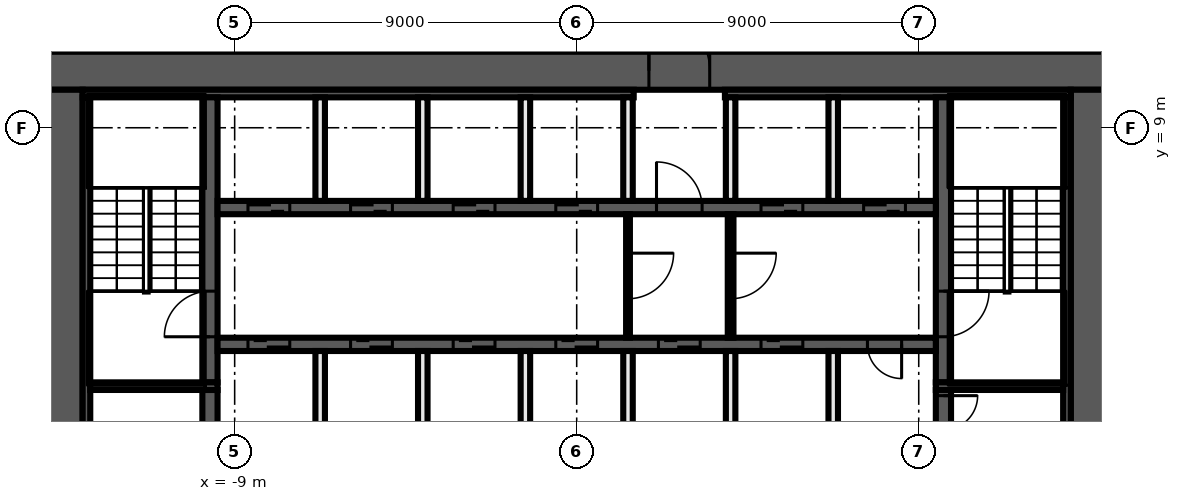
"""IFC4 building model, lengths in metres.
Left out: names, types, materials, properties, quantities, classifications, styles, units other than length and angle.
Written with IfcOpenShell. Run it as: python <this file> out.ifc"""

import sys

from ifc_helpers import new_model, si_unit, direction, frame, frame_2d, origin, place, context, subcontext, project, spatial, rectangle, extrude, element, fill, save


model = new_model("IFC4")
c1 = context("Model", 3, precision=1e-05, world=origin(), true_north=direction((0.0, 1.0)))
c2 = subcontext(c1, "Body", "Model", "MODEL_VIEW")
j1 = project(units=[si_unit("LENGTHUNIT", "METRE"), si_unit("PLANEANGLEUNIT", "RADIAN")], contexts=[c1])
p1 = place(None, origin())
s1 = spatial("IfcSite", under=j1, at=p1, CompositionType="ELEMENT")
p2 = place(p1, origin())
s2 = spatial("IfcBuilding", under=s1, at=p2, CompositionType="ELEMENT")
p3 = place(p2, frame((0.0, 0.0, 139.6)))
s3 = spatial("IfcBuildingStorey", under=s2, at=p3, CompositionType="ELEMENT", Elevation=139.6)
p4 = place(p3, frame((-14.0, 10.5, 0.0), z_axis=(0.0, 0.0, 1.0), x_axis=(1.0, 0.0, 0.0)))
e1 = element("IfcWall", 1, at=p4, inside=s3, PredefinedType="SHEAR", context=c2, shape_type="SweptSolid", body=[
    extrude(rectangle(XDim=28.0, YDim=1.0, at=frame_2d((14.0, 0.0))), origin(), (0.0, 0.0, 1.0), 5.4),
])
p5 = place(p4, frame((15.9, 0.0, 0.0)))
e2 = element("IfcOpeningElement", 2, at=p5, cuts=e1, PredefinedType="OPENING", context=c2, shape_type="SweptSolid", body=[
    extrude(rectangle(XDim=1.6, YDim=2.1, at=frame_2d((0.8, 1.05))), frame((0.0, 0.51, 0.0), z_axis=(0.0, -1.0, 0.0), x_axis=(1.0, 0.0, 0.0)), (0.0, 0.0, 1.0), 1.02),
])
for number, where, z_axis, x_axis in (
    (3, (13.5, 10.0, 0.0), (0.0, 0.0, 1.0), (0.0, -1.0, 0.0)),
    (4, (-13.5, -10.0, 0.0), (0.0, 0.0, 1.0), (0.0, 1.0, 0.0)),
):
    element("IfcWall", number, at=place(p3, frame(where, z_axis=z_axis, x_axis=x_axis)), inside=s3, PredefinedType="SHEAR", context=c2, shape_type="SweptSolid", body=[
        extrude(rectangle(XDim=20.0, YDim=1.0, at=frame_2d((10.0, 0.0))), origin(), (0.0, 0.0, 1.0), 5.4),
    ])
p6 = place(p3, frame((-13.0, 9.9, 0.0), z_axis=(0.0, 0.0, 1.0), x_axis=(1.0, 0.0, 0.0)))
e5 = element("IfcWall", 5, at=p6, inside=s3, PredefinedType="SHEAR", context=c2, shape_type="SweptSolid", body=[
    extrude(rectangle(XDim=14.5, YDim=0.2, at=frame_2d((7.25, 0.0))), origin(), (0.0, 0.0, 1.0), 5.4),
])
p7 = place(p3, frame((3.9, 9.9, 0.0), z_axis=(0.0, 0.0, 1.0), x_axis=(1.0, 0.0, 0.0)))
e6 = element("IfcWall", 6, at=p7, inside=s3, PredefinedType="SHEAR", context=c2, shape_type="SweptSolid", body=[
    extrude(rectangle(XDim=9.1, YDim=0.2, at=frame_2d((4.55, 0.0))), origin(), (0.0, 0.0, 1.0), 5.4),
])
for number, where, z_axis, x_axis in (
    (7, (12.9, 9.8, 0.0), (0.0, 0.0, 1.0), (0.0, -1.0, 0.0)),
    (8, (-12.9, -9.8, 0.0), (0.0, 0.0, 1.0), (0.0, 1.0, 0.0)),
):
    element("IfcWall", number, at=place(p3, frame(where, z_axis=z_axis, x_axis=x_axis)), inside=s3, PredefinedType="SHEAR", context=c2, shape_type="SweptSolid", body=[
        extrude(rectangle(XDim=19.6, YDim=0.2, at=frame_2d((9.8, 0.0))), origin(), (0.0, 0.0, 1.0), 5.4),
    ])
p8 = place(p3, frame((9.65, 2.1, 0.0), z_axis=(0.0, 0.0, 1.0), x_axis=(0.0, -1.0, 0.0)))
e9 = element("IfcWall", 9, at=p8, inside=s3, PredefinedType="SHEAR", context=c2, shape_type="SweptSolid", body=[
    extrude(rectangle(XDim=4.2, YDim=0.4, at=frame_2d((2.1, 0.0))), origin(), (0.0, 0.0, 1.0), 5.4),
])
p9 = place(p8, frame((0.15, 0.0, 0.0)))
e10 = element("IfcOpeningElement", 10, at=p9, cuts=e9, PredefinedType="OPENING", context=c2, shape_type="SweptSolid", body=[
    extrude(rectangle(XDim=0.9, YDim=2.1, at=frame_2d((0.45, 1.05))), frame((0.0, 0.21, 0.0), z_axis=(0.0, -1.0, 0.0), x_axis=(1.0, 0.0, 0.0)), (0.0, 0.0, 1.0), 0.42),
])
p10 = place(p3, frame((9.65, 9.8, 0.0), z_axis=(0.0, 0.0, 1.0), x_axis=(0.0, -1.0, 0.0)))
e11 = element("IfcWall", 11, at=p10, inside=s3, PredefinedType="SHEAR", context=c2, shape_type="SweptSolid", body=[
    extrude(rectangle(XDim=7.5, YDim=0.4, at=frame_2d((3.75, 0.0))), origin(), (0.0, 0.0, 1.0), 5.4),
])
p11 = place(p10, frame((5.1, 0.0, 0.0)))
e12 = element("IfcOpeningElement", 12, at=p11, cuts=e11, PredefinedType="OPENING", context=c2, shape_type="SweptSolid", body=[
    extrude(rectangle(XDim=1.2, YDim=2.1, at=frame_2d((0.6, 1.05))), frame((0.0, 0.21, 0.0), z_axis=(0.0, -1.0, 0.0), x_axis=(1.0, 0.0, 0.0)), (0.0, 0.0, 1.0), 0.42),
])
p12 = place(p3, frame((-9.65, -2.1, 0.0), z_axis=(0.0, 0.0, 1.0), x_axis=(0.0, 1.0, 0.0)))
e13 = element("IfcWall", 13, at=p12, inside=s3, PredefinedType="SHEAR", context=c2, shape_type="SweptSolid", body=[
    extrude(rectangle(XDim=4.2, YDim=0.4, at=frame_2d((2.1, 0.0))), origin(), (0.0, 0.0, 1.0), 5.4),
])
p13 = place(p3, frame((-9.65, 2.3, 0.0), z_axis=(0.0, 0.0, 1.0), x_axis=(0.0, 1.0, 0.0)))
e14 = element("IfcWall", 14, at=p13, inside=s3, PredefinedType="SHEAR", context=c2, shape_type="SweptSolid", body=[
    extrude(rectangle(XDim=7.5, YDim=0.4, at=frame_2d((3.75, 0.0))), origin(), (0.0, 0.0, 1.0), 5.4),
])
p14 = place(p13, frame((1.2, 0.0, 0.0)))
e15 = element("IfcOpeningElement", 15, at=p14, cuts=e14, PredefinedType="OPENING", context=c2, shape_type="SweptSolid", body=[
    extrude(rectangle(XDim=1.2, YDim=2.1, at=frame_2d((0.6, 1.05))), frame((0.0, 0.21, 0.0), z_axis=(0.0, -1.0, 0.0), x_axis=(1.0, 0.0, 0.0)), (0.0, 0.0, 1.0), 0.42),
])
for number, where, z_axis, x_axis in (
    (16, (9.45, 2.2, 0.0), (0.0, 0.0, 1.0), (1.0, 0.0, 0.0)),
    (17, (-9.45, 2.2, 0.0), (0.0, 0.0, 1.0), (-1.0, 0.0, 0.0)),
):
    element("IfcWall", number, at=place(p3, frame(where, z_axis=z_axis, x_axis=x_axis)), inside=s3, PredefinedType="SHEAR", context=c2, shape_type="SweptSolid", body=[
        extrude(rectangle(XDim=3.35, YDim=0.2, at=frame_2d((1.675, 0.0))), origin(), (0.0, 0.0, 1.0), 5.4),
    ])
p15 = place(p3, frame((-9.45, 6.9, 0.0), z_axis=(0.0, 0.0, 1.0), x_axis=(1.0, 0.0, 0.0)))
e18 = element("IfcWall", 18, at=p15, inside=s3, PredefinedType="SHEAR", context=c2, shape_type="SweptSolid", body=[
    extrude(rectangle(XDim=18.9, YDim=0.35, at=frame_2d((9.45, 0.0))), origin(), (0.0, 0.0, 1.0), 5.4),
])
p16 = place(p15, frame((0.8, 0.0, 0.0)))
e19 = element("IfcOpeningElement", 19, at=p16, cuts=e18, PredefinedType="OPENING", context=c2, shape_type="SweptSolid", body=[
    extrude(rectangle(XDim=1.1, YDim=2.1, at=frame_2d((0.55, 1.05))), frame((0.0, 0.185, 0.0), z_axis=(0.0, -1.0, 0.0), x_axis=(1.0, 0.0, 0.0)), (0.0, 0.0, 1.0), 0.37),
])
p17 = place(p15, frame((3.5, 0.0, 0.0)))
e20 = element("IfcOpeningElement", 20, at=p17, cuts=e18, PredefinedType="OPENING", context=c2, shape_type="SweptSolid", body=[
    extrude(rectangle(XDim=1.1, YDim=2.1, at=frame_2d((0.55, 1.05))), frame((0.0, 0.185, 0.0), z_axis=(0.0, -1.0, 0.0), x_axis=(1.0, 0.0, 0.0)), (0.0, 0.0, 1.0), 0.37),
])
p18 = place(p15, frame((6.2, 0.0, 0.0)))
e21 = element("IfcOpeningElement", 21, at=p18, cuts=e18, PredefinedType="OPENING", context=c2, shape_type="SweptSolid", body=[
    extrude(rectangle(XDim=1.1, YDim=2.1, at=frame_2d((0.55, 1.05))), frame((0.0, 0.185, 0.0), z_axis=(0.0, -1.0, 0.0), x_axis=(1.0, 0.0, 0.0)), (0.0, 0.0, 1.0), 0.37),
])
p19 = place(p15, frame((8.9, 0.0, 0.0)))
e22 = element("IfcOpeningElement", 22, at=p19, cuts=e18, PredefinedType="OPENING", context=c2, shape_type="SweptSolid", body=[
    extrude(rectangle(XDim=1.1, YDim=2.1, at=frame_2d((0.55, 1.05))), frame((0.0, 0.185, 0.0), z_axis=(0.0, -1.0, 0.0), x_axis=(1.0, 0.0, 0.0)), (0.0, 0.0, 1.0), 0.37),
])
p20 = place(p15, frame((11.55, 0.0, 0.0)))
e23 = element("IfcOpeningElement", 23, at=p20, cuts=e18, PredefinedType="OPENING", context=c2, shape_type="SweptSolid", body=[
    extrude(rectangle(XDim=1.2, YDim=2.1, at=frame_2d((0.6, 1.05))), frame((0.0, 0.185, 0.0), z_axis=(0.0, -1.0, 0.0), x_axis=(1.0, 0.0, 0.0)), (0.0, 0.0, 1.0), 0.37),
])
p21 = place(p15, frame((14.3, 0.0, 0.0)))
e24 = element("IfcOpeningElement", 24, at=p21, cuts=e18, PredefinedType="OPENING", context=c2, shape_type="SweptSolid", body=[
    extrude(rectangle(XDim=1.1, YDim=2.1, at=frame_2d((0.55, 1.05))), frame((0.0, 0.185, 0.0), z_axis=(0.0, -1.0, 0.0), x_axis=(1.0, 0.0, 0.0)), (0.0, 0.0, 1.0), 0.37),
])
p22 = place(p15, frame((17.0, 0.0, 0.0)))
e25 = element("IfcOpeningElement", 25, at=p22, cuts=e18, PredefinedType="OPENING", context=c2, shape_type="SweptSolid", body=[
    extrude(rectangle(XDim=1.1, YDim=2.1, at=frame_2d((0.55, 1.05))), frame((0.0, 0.185, 0.0), z_axis=(0.0, -1.0, 0.0), x_axis=(1.0, 0.0, 0.0)), (0.0, 0.0, 1.0), 0.37),
])
p23 = place(p3, frame((9.45, 3.3, 0.0), z_axis=(0.0, 0.0, 1.0), x_axis=(-1.0, 0.0, 0.0)))
e26 = element("IfcWall", 26, at=p23, inside=s3, PredefinedType="SHEAR", context=c2, shape_type="SweptSolid", body=[
    extrude(rectangle(XDim=18.9, YDim=0.35, at=frame_2d((9.45, 0.0))), origin(), (0.0, 0.0, 1.0), 5.4),
])
p24 = place(p23, frame((17.0, 0.0, 0.0)))
e27 = element("IfcOpeningElement", 27, at=p24, cuts=e26, PredefinedType="OPENING", context=c2, shape_type="SweptSolid", body=[
    extrude(rectangle(XDim=1.1, YDim=2.1, at=frame_2d((0.55, 1.05))), frame((0.0, 0.185, 0.0), z_axis=(0.0, -1.0, 0.0), x_axis=(1.0, 0.0, 0.0)), (0.0, 0.0, 1.0), 0.37),
])
p25 = place(p23, frame((14.3, 0.0, 0.0)))
e28 = element("IfcOpeningElement", 28, at=p25, cuts=e26, PredefinedType="OPENING", context=c2, shape_type="SweptSolid", body=[
    extrude(rectangle(XDim=1.1, YDim=2.1, at=frame_2d((0.55, 1.05))), frame((0.0, 0.185, 0.0), z_axis=(0.0, -1.0, 0.0), x_axis=(1.0, 0.0, 0.0)), (0.0, 0.0, 1.0), 0.37),
])
p26 = place(p23, frame((11.6, 0.0, 0.0)))
e29 = element("IfcOpeningElement", 29, at=p26, cuts=e26, PredefinedType="OPENING", context=c2, shape_type="SweptSolid", body=[
    extrude(rectangle(XDim=1.1, YDim=2.1, at=frame_2d((0.55, 1.05))), frame((0.0, 0.185, 0.0), z_axis=(0.0, -1.0, 0.0), x_axis=(1.0, 0.0, 0.0)), (0.0, 0.0, 1.0), 0.37),
])
p27 = place(p23, frame((8.9, 0.0, 0.0)))
e30 = element("IfcOpeningElement", 30, at=p27, cuts=e26, PredefinedType="OPENING", context=c2, shape_type="SweptSolid", body=[
    extrude(rectangle(XDim=1.1, YDim=2.1, at=frame_2d((0.55, 1.05))), frame((0.0, 0.185, 0.0), z_axis=(0.0, -1.0, 0.0), x_axis=(1.0, 0.0, 0.0)), (0.0, 0.0, 1.0), 0.37),
])
p28 = place(p23, frame((6.2, 0.0, 0.0)))
e31 = element("IfcOpeningElement", 31, at=p28, cuts=e26, PredefinedType="OPENING", context=c2, shape_type="SweptSolid", body=[
    extrude(rectangle(XDim=1.1, YDim=2.1, at=frame_2d((0.55, 1.05))), frame((0.0, 0.185, 0.0), z_axis=(0.0, -1.0, 0.0), x_axis=(1.0, 0.0, 0.0)), (0.0, 0.0, 1.0), 0.37),
])
p29 = place(p23, frame((3.5, 0.0, 0.0)))
e32 = element("IfcOpeningElement", 32, at=p29, cuts=e26, PredefinedType="OPENING", context=c2, shape_type="SweptSolid", body=[
    extrude(rectangle(XDim=1.1, YDim=2.1, at=frame_2d((0.55, 1.05))), frame((0.0, 0.185, 0.0), z_axis=(0.0, -1.0, 0.0), x_axis=(1.0, 0.0, 0.0)), (0.0, 0.0, 1.0), 0.37),
])
p30 = place(p23, frame((0.9, 0.0, 0.0)))
e33 = element("IfcOpeningElement", 33, at=p30, cuts=e26, PredefinedType="OPENING", context=c2, shape_type="SweptSolid", body=[
    extrude(rectangle(XDim=0.9, YDim=2.1, at=frame_2d((0.45, 1.05))), frame((0.0, 0.185, 0.0), z_axis=(0.0, -1.0, 0.0), x_axis=(1.0, 0.0, 0.0)), (0.0, 0.0, 1.0), 0.37),
])
for number, where, z_axis, x_axis in (
    (34, (6.75, 0.4, 0.0), (0.0, 0.0, 1.0), (0.0, 1.0, 0.0)),
    (35, (6.75, 7.075, 0.0), (0.0, 0.0, 1.0), (0.0, 1.0, 0.0)),
):
    element("IfcWall", number, at=place(p3, frame(where, z_axis=z_axis, x_axis=x_axis)), inside=s3, PredefinedType="SOLIDWALL", context=c2, shape_type="SweptSolid", body=[
        extrude(rectangle(XDim=2.725, YDim=0.25, at=frame_2d((1.363, 0.0))), origin(), (0.0, 0.0, 1.0), 5.4),
    ])
p31 = place(p3, frame((4.05, 6.725, 0.0), z_axis=(0.0, 0.0, 1.0), x_axis=(0.0, -1.0, 0.0)))
e36 = element("IfcWall", 36, at=p31, inside=s3, PredefinedType="PARTITIONING", context=c2, shape_type="SweptSolid", body=[
    extrude(rectangle(XDim=3.25, YDim=0.15, at=frame_2d((1.625, 0.0))), origin(), (0.0, 0.0, 1.0), 5.4),
])
p32 = place(p31, frame((1.025, 0.0, 0.0)))
e37 = element("IfcOpeningElement", 37, at=p32, cuts=e36, PredefinedType="OPENING", context=c2, shape_type="SweptSolid", body=[
    extrude(rectangle(XDim=1.2, YDim=2.1, at=frame_2d((0.6, 1.05))), frame((0.0, 0.085, 0.0), z_axis=(0.0, -1.0, 0.0), x_axis=(1.0, 0.0, 0.0)), (0.0, 0.0, 1.0), 0.17),
])
for number, where, z_axis, x_axis in (
    (38, (4.05, 0.4, 0.0), (0.0, 0.0, 1.0), (0.0, 1.0, 0.0)),
    (39, (4.05, 7.075, 0.0), (0.0, 0.0, 1.0), (0.0, 1.0, 0.0)),
):
    element("IfcWall", number, at=place(p3, frame(where, z_axis=z_axis, x_axis=x_axis)), inside=s3, PredefinedType="SOLIDWALL", context=c2, shape_type="SweptSolid", body=[
        extrude(rectangle(XDim=2.725, YDim=0.25, at=frame_2d((1.363, 0.0))), origin(), (0.0, 0.0, 1.0), 5.4),
    ])
p33 = place(p3, frame((1.35, 6.725, 0.0), z_axis=(0.0, 0.0, 1.0), x_axis=(0.0, -1.0, 0.0)))
e40 = element("IfcWall", 40, at=p33, inside=s3, PredefinedType="PARTITIONING", context=c2, shape_type="SweptSolid", body=[
    extrude(rectangle(XDim=3.25, YDim=0.1, at=frame_2d((1.625, 0.0))), origin(), (0.0, 0.0, 1.0), 5.4),
])
p34 = place(p33, frame((1.025, 0.0, 0.0)))
e41 = element("IfcOpeningElement", 41, at=p34, cuts=e40, PredefinedType="OPENING", context=c2, shape_type="SweptSolid", body=[
    extrude(rectangle(XDim=1.2, YDim=2.1, at=frame_2d((0.6, 1.05))), frame((0.0, 0.06, 0.0), z_axis=(0.0, -1.0, 0.0), x_axis=(1.0, 0.0, 0.0)), (0.0, 0.0, 1.0), 0.12),
])
for number, where, z_axis, x_axis in (
    (42, (1.35, 0.4, 0.0), (0.0, 0.0, 1.0), (0.0, 1.0, 0.0)),
    (43, (1.35, 7.075, 0.0), (0.0, 0.0, 1.0), (0.0, 1.0, 0.0)),
    (44, (-1.35, 0.4, 0.0), (0.0, 0.0, 1.0), (0.0, 1.0, 0.0)),
    (45, (-1.35, 7.075, 0.0), (0.0, 0.0, 1.0), (0.0, 1.0, 0.0)),
    (46, (-4.05, 0.4, 0.0), (0.0, 0.0, 1.0), (0.0, 1.0, 0.0)),
    (47, (-4.05, 7.075, 0.0), (0.0, 0.0, 1.0), (0.0, 1.0, 0.0)),
    (48, (-6.75, 0.4, 0.0), (0.0, 0.0, 1.0), (0.0, 1.0, 0.0)),
    (49, (-6.75, 7.075, 0.0), (0.0, 0.0, 1.0), (0.0, 1.0, 0.0)),
):
    element("IfcWall", number, at=place(p3, frame(where, z_axis=z_axis, x_axis=x_axis)), inside=s3, PredefinedType="SOLIDWALL", context=c2, shape_type="SweptSolid", body=[
        extrude(rectangle(XDim=2.725, YDim=0.25, at=frame_2d((1.363, 0.0))), origin(), (0.0, 0.0, 1.0), 5.4),
    ])
p35 = place(p9, origin())
e50 = element("IfcDoor", 50, at=p35, inside=s3, OperationType="SINGLE_SWING_RIGHT", PredefinedType="DOOR", context=c2, shape_type="SweptSolid", body=[
    extrude(rectangle(XDim=0.9, YDim=2.1, at=frame_2d((0.45, 1.05))), frame((0.0, 0.025, 0.0), z_axis=(0.0, -1.0, 0.0), x_axis=(1.0, 0.0, 0.0)), (0.0, 0.0, 1.0), 0.05),
])
fill(e10, e50)
p36 = place(p16, origin())
e51 = element("IfcDoor", 51, at=p36, inside=s3, OperationType="DOUBLE_DOOR_SLIDING", PredefinedType="DOOR", context=c2, shape_type="SweptSolid", body=[
    extrude(rectangle(XDim=1.1, YDim=2.1, at=frame_2d((0.55, 1.05))), frame((0.0, 0.025, 0.0), z_axis=(0.0, -1.0, 0.0), x_axis=(1.0, 0.0, 0.0)), (0.0, 0.0, 1.0), 0.05),
])
fill(e19, e51)
p37 = place(p17, origin())
e52 = element("IfcDoor", 52, at=p37, inside=s3, OperationType="DOUBLE_DOOR_SLIDING", PredefinedType="DOOR", context=c2, shape_type="SweptSolid", body=[
    extrude(rectangle(XDim=1.1, YDim=2.1, at=frame_2d((0.55, 1.05))), frame((0.0, 0.025, 0.0), z_axis=(0.0, -1.0, 0.0), x_axis=(1.0, 0.0, 0.0)), (0.0, 0.0, 1.0), 0.05),
])
fill(e20, e52)
p38 = place(p18, origin())
e53 = element("IfcDoor", 53, at=p38, inside=s3, OperationType="DOUBLE_DOOR_SLIDING", PredefinedType="DOOR", context=c2, shape_type="SweptSolid", body=[
    extrude(rectangle(XDim=1.1, YDim=2.1, at=frame_2d((0.55, 1.05))), frame((0.0, 0.025, 0.0), z_axis=(0.0, -1.0, 0.0), x_axis=(1.0, 0.0, 0.0)), (0.0, 0.0, 1.0), 0.05),
])
fill(e21, e53)
p39 = place(p19, origin())
e54 = element("IfcDoor", 54, at=p39, inside=s3, OperationType="DOUBLE_DOOR_SLIDING", PredefinedType="DOOR", context=c2, shape_type="SweptSolid", body=[
    extrude(rectangle(XDim=1.1, YDim=2.1, at=frame_2d((0.55, 1.05))), frame((0.0, 0.025, 0.0), z_axis=(0.0, -1.0, 0.0), x_axis=(1.0, 0.0, 0.0)), (0.0, 0.0, 1.0), 0.05),
])
fill(e22, e54)
p40 = place(p5, origin())
e55 = element("IfcDoor", 55, at=p40, inside=s3, OperationType="DOUBLE_DOOR_SINGLE_SWING", PredefinedType="DOOR", context=c2, shape_type="SweptSolid", body=[
    extrude(rectangle(XDim=1.6, YDim=2.1, at=frame_2d((0.8, 1.05))), frame((0.0, 0.025, 0.0), z_axis=(0.0, -1.0, 0.0), x_axis=(1.0, 0.0, 0.0)), (0.0, 0.0, 1.0), 0.05),
])
fill(e2, e55)
p41 = place(p20, origin())
e56 = element("IfcDoor", 56, at=p41, inside=s3, OperationType="SINGLE_SWING_LEFT", PredefinedType="DOOR", context=c2, shape_type="SweptSolid", body=[
    extrude(rectangle(XDim=1.2, YDim=2.1, at=frame_2d((0.6, 1.05))), frame((0.0, 0.025, 0.0), z_axis=(0.0, -1.0, 0.0), x_axis=(1.0, 0.0, 0.0)), (0.0, 0.0, 1.0), 0.05),
])
fill(e23, e56)
p42 = place(p21, origin())
e57 = element("IfcDoor", 57, at=p42, inside=s3, OperationType="DOUBLE_DOOR_SLIDING", PredefinedType="DOOR", context=c2, shape_type="SweptSolid", body=[
    extrude(rectangle(XDim=1.1, YDim=2.1, at=frame_2d((0.55, 1.05))), frame((0.0, 0.025, 0.0), z_axis=(0.0, -1.0, 0.0), x_axis=(1.0, 0.0, 0.0)), (0.0, 0.0, 1.0), 0.05),
])
fill(e24, e57)
p43 = place(p22, origin())
e58 = element("IfcDoor", 58, at=p43, inside=s3, OperationType="DOUBLE_DOOR_SLIDING", PredefinedType="DOOR", context=c2, shape_type="SweptSolid", body=[
    extrude(rectangle(XDim=1.1, YDim=2.1, at=frame_2d((0.55, 1.05))), frame((0.0, 0.025, 0.0), z_axis=(0.0, -1.0, 0.0), x_axis=(1.0, 0.0, 0.0)), (0.0, 0.0, 1.0), 0.05),
])
fill(e25, e58)
p44 = place(p24, origin())
e59 = element("IfcDoor", 59, at=p44, inside=s3, OperationType="DOUBLE_DOOR_SLIDING", PredefinedType="DOOR", context=c2, shape_type="SweptSolid", body=[
    extrude(rectangle(XDim=1.1, YDim=2.1, at=frame_2d((0.55, 1.05))), frame((0.0, 0.025, 0.0), z_axis=(0.0, -1.0, 0.0), x_axis=(1.0, 0.0, 0.0)), (0.0, 0.0, 1.0), 0.05),
])
fill(e27, e59)
p45 = place(p25, origin())
e60 = element("IfcDoor", 60, at=p45, inside=s3, OperationType="DOUBLE_DOOR_SLIDING", PredefinedType="DOOR", context=c2, shape_type="SweptSolid", body=[
    extrude(rectangle(XDim=1.1, YDim=2.1, at=frame_2d((0.55, 1.05))), frame((0.0, 0.025, 0.0), z_axis=(0.0, -1.0, 0.0), x_axis=(1.0, 0.0, 0.0)), (0.0, 0.0, 1.0), 0.05),
])
fill(e28, e60)
p46 = place(p26, origin())
e61 = element("IfcDoor", 61, at=p46, inside=s3, OperationType="DOUBLE_DOOR_SLIDING", PredefinedType="DOOR", context=c2, shape_type="SweptSolid", body=[
    extrude(rectangle(XDim=1.1, YDim=2.1, at=frame_2d((0.55, 1.05))), frame((0.0, 0.025, 0.0), z_axis=(0.0, -1.0, 0.0), x_axis=(1.0, 0.0, 0.0)), (0.0, 0.0, 1.0), 0.05),
])
fill(e29, e61)
p47 = place(p27, origin())
e62 = element("IfcDoor", 62, at=p47, inside=s3, OperationType="DOUBLE_DOOR_SLIDING", PredefinedType="DOOR", context=c2, shape_type="SweptSolid", body=[
    extrude(rectangle(XDim=1.1, YDim=2.1, at=frame_2d((0.55, 1.05))), frame((0.0, 0.025, 0.0), z_axis=(0.0, -1.0, 0.0), x_axis=(1.0, 0.0, 0.0)), (0.0, 0.0, 1.0), 0.05),
])
fill(e30, e62)
p48 = place(p28, origin())
e63 = element("IfcDoor", 63, at=p48, inside=s3, OperationType="DOUBLE_DOOR_SLIDING", PredefinedType="DOOR", context=c2, shape_type="SweptSolid", body=[
    extrude(rectangle(XDim=1.1, YDim=2.1, at=frame_2d((0.55, 1.05))), frame((0.0, 0.025, 0.0), z_axis=(0.0, -1.0, 0.0), x_axis=(1.0, 0.0, 0.0)), (0.0, 0.0, 1.0), 0.05),
])
fill(e31, e63)
p49 = place(p29, origin())
e64 = element("IfcDoor", 64, at=p49, inside=s3, OperationType="DOUBLE_DOOR_SLIDING", PredefinedType="DOOR", context=c2, shape_type="SweptSolid", body=[
    extrude(rectangle(XDim=1.1, YDim=2.1, at=frame_2d((0.55, 1.05))), frame((0.0, 0.025, 0.0), z_axis=(0.0, -1.0, 0.0), x_axis=(1.0, 0.0, 0.0)), (0.0, 0.0, 1.0), 0.05),
])
fill(e32, e64)
p50 = place(p30, origin())
e65 = element("IfcDoor", 65, at=p50, inside=s3, OperationType="SINGLE_SWING_LEFT", PredefinedType="DOOR", context=c2, shape_type="SweptSolid", body=[
    extrude(rectangle(XDim=0.9, YDim=2.1, at=frame_2d((0.45, 1.05))), frame((0.0, 0.025, 0.0), z_axis=(0.0, -1.0, 0.0), x_axis=(1.0, 0.0, 0.0)), (0.0, 0.0, 1.0), 0.05),
])
fill(e33, e65)
p51 = place(p11, origin())
e66 = element("IfcDoor", 66, at=p51, inside=s3, OperationType="SINGLE_SWING_LEFT", PredefinedType="DOOR", context=c2, shape_type="SweptSolid", body=[
    extrude(rectangle(XDim=1.2, YDim=2.1, at=frame_2d((0.6, 1.05))), frame((0.0, 0.025, 0.0), z_axis=(0.0, -1.0, 0.0), x_axis=(1.0, 0.0, 0.0)), (0.0, 0.0, 1.0), 0.05),
])
fill(e12, e66)
p52 = place(p14, origin())
e67 = element("IfcDoor", 67, at=p52, inside=s3, OperationType="SINGLE_SWING_RIGHT", PredefinedType="DOOR", context=c2, shape_type="SweptSolid", body=[
    extrude(rectangle(XDim=1.2, YDim=2.1, at=frame_2d((0.6, 1.05))), frame((0.0, 0.025, 0.0), z_axis=(0.0, -1.0, 0.0), x_axis=(1.0, 0.0, 0.0)), (0.0, 0.0, 1.0), 0.05),
])
fill(e15, e67)
p53 = place(p34, origin())
e68 = element("IfcDoor", 68, at=p53, inside=s3, OperationType="SINGLE_SWING_LEFT", PredefinedType="DOOR", context=c2, shape_type="SweptSolid", body=[
    extrude(rectangle(XDim=1.2, YDim=2.1, at=frame_2d((0.6, 1.05))), frame((0.0, 0.025, 0.0), z_axis=(0.0, -1.0, 0.0), x_axis=(1.0, 0.0, 0.0)), (0.0, 0.0, 1.0), 0.05),
])
fill(e41, e68)
p54 = place(p32, origin())
e69 = element("IfcDoor", 69, at=p54, inside=s3, OperationType="SINGLE_SWING_RIGHT", PredefinedType="DOOR", context=c2, shape_type="SweptSolid", body=[
    extrude(rectangle(XDim=1.2, YDim=2.1, at=frame_2d((0.6, 1.05))), frame((0.0, 0.025, 0.0), z_axis=(0.0, -1.0, 0.0), x_axis=(1.0, 0.0, 0.0)), (0.0, 0.0, 1.0), 0.05),
])
fill(e37, e69)
save(model, sys.argv[1])
